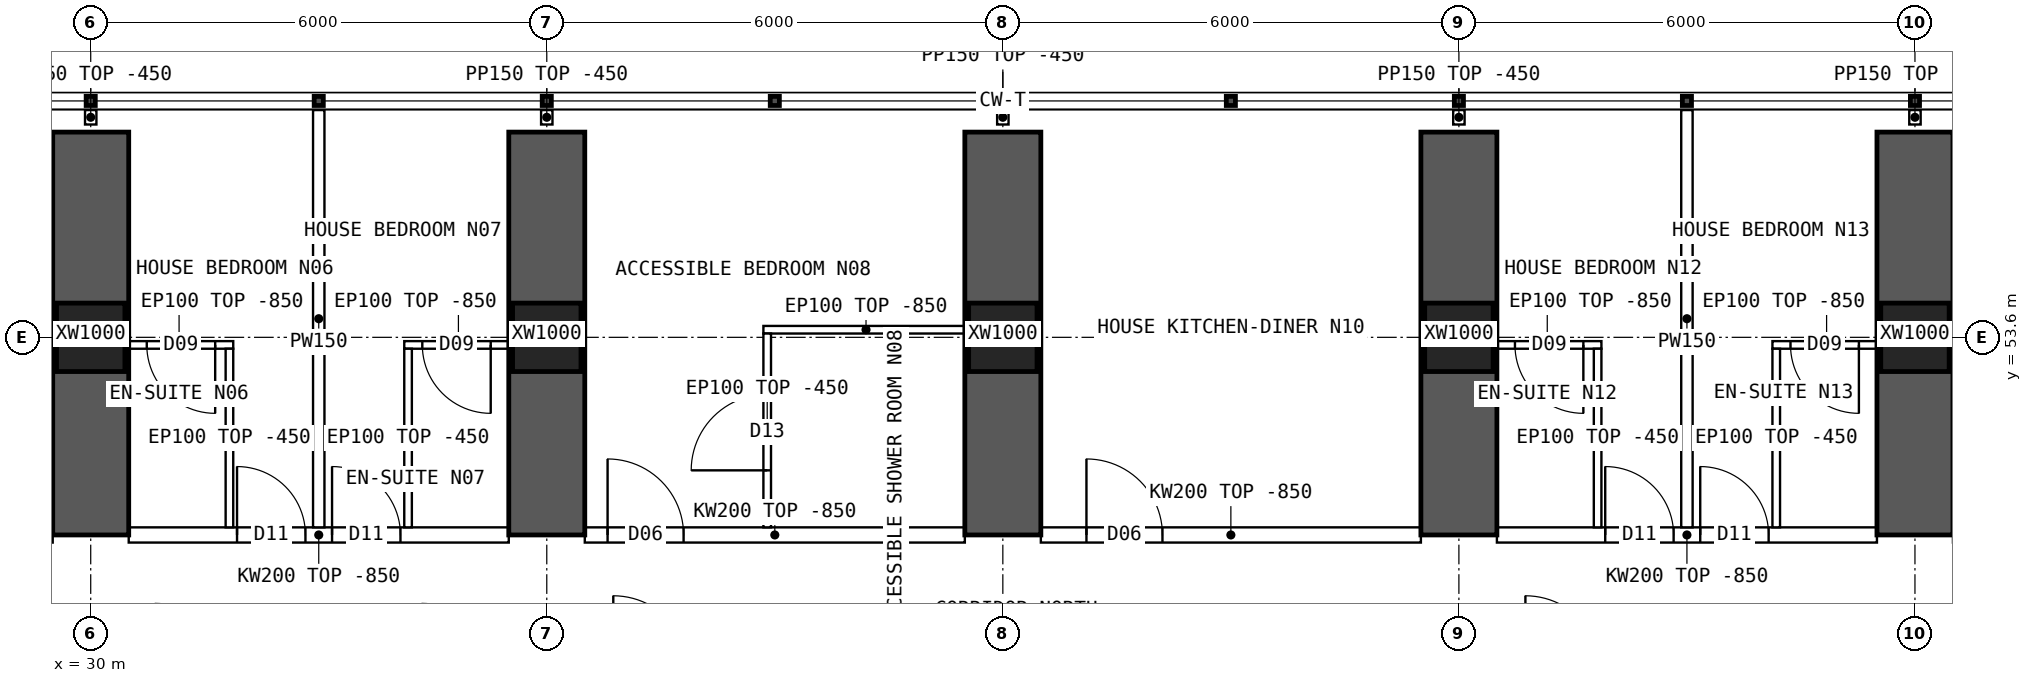
"""IFC4 building model, lengths in metres.
Left out: names, types, materials, properties, quantities, classifications, styles, units other than length and angle.
Written with IfcOpenShell. Run it as: python <this file> out.ifc"""

import sys

from ifc_helpers import new_model, si_unit, direction, frame, frame_2d, origin, origin_2d, place, context, subcontext, project, spatial, polyline, rectangle, hollow_rectangle, outline, extrude, element, fill, save


model = new_model("IFC4")
c1 = context("Model", 3, precision=1e-05, world=origin(), true_north=direction((0.0, 1.0)))
c2 = subcontext(c1, "Body", "Model", "MODEL_VIEW")
j1 = project(units=[si_unit("LENGTHUNIT", "METRE"), si_unit("PLANEANGLEUNIT", "RADIAN")], contexts=[c1])
p1 = place(None, origin())
s1 = spatial("IfcSite", under=j1, at=p1, CompositionType="ELEMENT")
p2 = place(p1, origin())
s2 = spatial("IfcBuilding", under=s1, at=p2, CompositionType="ELEMENT")
p3 = place(p2, frame((0.0, 0.0, 20.2)))
s3 = spatial("IfcBuildingStorey", under=s2, at=p3, CompositionType="ELEMENT", Elevation=20.2)
for number, where, z_axis, x_axis in (
    (1, (30.0, 53.6, 0.0), (0.0, 0.0, 1.0), (1.0, 0.0, 0.0)),
    (2, (36.0, 53.6, 0.0), (0.0, 0.0, 1.0), (1.0, 0.0, 0.0)),
    (3, (42.0, 53.6, 0.0), (0.0, 0.0, 1.0), (1.0, 0.0, 0.0)),
    (4, (48.0, 53.6, 0.0), (0.0, 0.0, 1.0), (1.0, 0.0, 0.0)),
    (5, (54.0, 53.6, 0.0), (0.0, 0.0, 1.0), (1.0, 0.0, 0.0)),
):
    element("IfcColumn", number, at=place(p3, frame(where, z_axis=z_axis, x_axis=x_axis)), inside=s3, PredefinedType="COLUMN", context=c2, shape_type="SweptSolid", body=[
        extrude(hollow_rectangle(XDim=0.9, YDim=0.9, WallThickness=0.09, at=origin_2d()), origin(), (0.0, 0.0, 1.0), 3.75),
    ])
for number, where, z_axis, x_axis in (
    (6, (30.0, 51.0, 0.0), (0.0, 0.0, 1.0), (0.0, 1.0, 0.0)),
    (7, (36.0, 51.0, 0.0), (0.0, 0.0, 1.0), (0.0, 1.0, 0.0)),
    (8, (42.0, 51.0, 0.0), (0.0, 0.0, 1.0), (0.0, 1.0, 0.0)),
    (9, (48.0, 51.0, 0.0), (0.0, 0.0, 1.0), (0.0, 1.0, 0.0)),
    (10, (54.0, 51.0, 0.0), (0.0, 0.0, 1.0), (0.0, 1.0, 0.0)),
):
    element("IfcWall", number, at=place(p3, frame(where, z_axis=z_axis, x_axis=x_axis)), inside=s3, PredefinedType="SHEAR", context=c2, shape_type="SweptSolid", body=[
        extrude(rectangle(XDim=5.3, YDim=1.0, at=frame_2d((2.65, 0.0))), origin(), (0.0, 0.0, 1.0), 3.75),
    ])
p4 = place(p3, frame((30.5, 51.0, 0.0), z_axis=(0.0, 0.0, 1.0), x_axis=(1.0, 0.0, 0.0)))
e11 = element("IfcWall", 11, at=p4, inside=s3, PredefinedType="SOLIDWALL", context=c2, shape_type="SweptSolid", body=[
    extrude(outline(polyline([(0.0, 0.0), (5.0, 0.0), (5.0, 2.9), (0.0, 2.9), (0.0, 0.0)])), frame((0.0, 0.1, 0.0), z_axis=(0.0, -1.0, 0.0), x_axis=(1.0, 0.0, 0.0)), (0.0, 0.0, 1.0), 0.2),
])
p5 = place(p4, frame((1.425, 0.0, 0.0)))
e12 = element("IfcOpeningElement", 12, at=p5, cuts=e11, PredefinedType="OPENING", context=c2, shape_type="SweptSolid", body=[
    extrude(rectangle(XDim=0.9, YDim=2.1, at=frame_2d((0.45, 1.05))), frame((0.0, 0.11, 0.0), z_axis=(0.0, -1.0, 0.0), x_axis=(1.0, 0.0, 0.0)), (0.0, 0.0, 1.0), 0.22),
])
p6 = place(p4, frame((2.675, 0.0, 0.0)))
e13 = element("IfcOpeningElement", 13, at=p6, cuts=e11, PredefinedType="OPENING", context=c2, shape_type="SweptSolid", body=[
    extrude(rectangle(XDim=0.9, YDim=2.1, at=frame_2d((0.45, 1.05))), frame((0.0, 0.11, 0.0), z_axis=(0.0, -1.0, 0.0), x_axis=(1.0, 0.0, 0.0)), (0.0, 0.0, 1.0), 0.22),
])
p7 = place(p3, frame((36.5, 51.0, 0.0), z_axis=(0.0, 0.0, 1.0), x_axis=(1.0, 0.0, 0.0)))
e14 = element("IfcWall", 14, at=p7, inside=s3, PredefinedType="SOLIDWALL", context=c2, shape_type="SweptSolid", body=[
    extrude(outline(polyline([(0.0, 0.0), (5.0, 0.0), (5.0, 2.9), (0.0, 2.9), (0.0, 0.0)])), frame((0.0, 0.1, 0.0), z_axis=(0.0, -1.0, 0.0), x_axis=(1.0, 0.0, 0.0)), (0.0, 0.0, 1.0), 0.2),
])
p8 = place(p7, frame((0.3, 0.0, 0.0)))
e15 = element("IfcOpeningElement", 15, at=p8, cuts=e14, PredefinedType="OPENING", context=c2, shape_type="SweptSolid", body=[
    extrude(rectangle(XDim=1.0, YDim=2.1, at=frame_2d((0.5, 1.05))), frame((0.0, 0.11, 0.0), z_axis=(0.0, -1.0, 0.0), x_axis=(1.0, 0.0, 0.0)), (0.0, 0.0, 1.0), 0.22),
])
p9 = place(p3, frame((42.5, 51.0, 0.0), z_axis=(0.0, 0.0, 1.0), x_axis=(1.0, 0.0, 0.0)))
e16 = element("IfcWall", 16, at=p9, inside=s3, PredefinedType="SOLIDWALL", context=c2, shape_type="SweptSolid", body=[
    extrude(outline(polyline([(0.0, 0.0), (5.0, 0.0), (5.0, 2.9), (0.0, 2.9), (0.0, 0.0)])), frame((0.0, 0.1, 0.0), z_axis=(0.0, -1.0, 0.0), x_axis=(1.0, 0.0, 0.0)), (0.0, 0.0, 1.0), 0.2),
])
p10 = place(p9, frame((0.6, 0.0, 0.0)))
e17 = element("IfcOpeningElement", 17, at=p10, cuts=e16, PredefinedType="OPENING", context=c2, shape_type="SweptSolid", body=[
    extrude(rectangle(XDim=1.0, YDim=2.1, at=frame_2d((0.5, 1.05))), frame((0.0, 0.11, 0.0), z_axis=(0.0, -1.0, 0.0), x_axis=(1.0, 0.0, 0.0)), (0.0, 0.0, 1.0), 0.22),
])
p11 = place(p3, frame((48.5, 51.0, 0.0), z_axis=(0.0, 0.0, 1.0), x_axis=(1.0, 0.0, 0.0)))
e18 = element("IfcWall", 18, at=p11, inside=s3, PredefinedType="SOLIDWALL", context=c2, shape_type="SweptSolid", body=[
    extrude(outline(polyline([(0.0, 0.0), (5.0, 0.0), (5.0, 2.9), (0.0, 2.9), (0.0, 0.0)])), frame((0.0, 0.1, 0.0), z_axis=(0.0, -1.0, 0.0), x_axis=(1.0, 0.0, 0.0)), (0.0, 0.0, 1.0), 0.2),
])
p12 = place(p11, frame((1.425, 0.0, 0.0)))
e19 = element("IfcOpeningElement", 19, at=p12, cuts=e18, PredefinedType="OPENING", context=c2, shape_type="SweptSolid", body=[
    extrude(rectangle(XDim=0.9, YDim=2.1, at=frame_2d((0.45, 1.05))), frame((0.0, 0.11, 0.0), z_axis=(0.0, -1.0, 0.0), x_axis=(1.0, 0.0, 0.0)), (0.0, 0.0, 1.0), 0.22),
])
p13 = place(p11, frame((2.675, 0.0, 0.0)))
e20 = element("IfcOpeningElement", 20, at=p13, cuts=e18, PredefinedType="OPENING", context=c2, shape_type="SweptSolid", body=[
    extrude(rectangle(XDim=0.9, YDim=2.1, at=frame_2d((0.45, 1.05))), frame((0.0, 0.11, 0.0), z_axis=(0.0, -1.0, 0.0), x_axis=(1.0, 0.0, 0.0)), (0.0, 0.0, 1.0), 0.22),
])
p14 = place(p3, frame((33.0, 56.59, 0.0), z_axis=(0.0, 0.0, 1.0), x_axis=(0.0, -1.0, 0.0)))
e21 = element("IfcWall", 21, at=p14, inside=s3, PredefinedType="PARTITIONING", context=c2, shape_type="SweptSolid", body=[
    extrude(outline(polyline([(0.0, 0.0), (5.49, 0.0), (5.49, 2.9), (5.442, 2.9), (5.44, 3.3), (3.192, 3.3), (3.19, 2.9), (2.792, 2.9), (2.79, 3.3), (0.0, 3.3), (0.0, 0.0)])), frame((0.0, 0.075, 0.0), z_axis=(0.0, -1.0, 0.0), x_axis=(1.0, 0.0, 0.0)), (0.0, 0.0, 1.0), 0.15),
])
p15 = place(p3, frame((30.45, 53.5, 0.0), z_axis=(0.0, 0.0, 1.0), x_axis=(1.0, 0.0, 0.0)))
e22 = element("IfcWall", 22, at=p15, inside=s3, PredefinedType="PARTITIONING", context=c2, shape_type="SweptSolid", body=[
    extrude(outline(polyline([(0.0, 0.0), (1.425, 0.0), (1.425, 2.9), (0.0, 2.9), (0.0, 0.0)])), frame((0.0, 0.05, 0.0), z_axis=(0.0, -1.0, 0.0), x_axis=(1.0, 0.0, 0.0)), (0.0, 0.0, 1.0), 0.1),
])
p16 = place(p15, frame((0.288, 0.0, 0.0)))
e23 = element("IfcOpeningElement", 23, at=p16, cuts=e22, PredefinedType="OPENING", context=c2, shape_type="SweptSolid", body=[
    extrude(rectangle(XDim=0.9, YDim=2.1, at=frame_2d((0.45, 1.05))), frame((0.0, 0.06, 0.0), z_axis=(0.0, -1.0, 0.0), x_axis=(1.0, 0.0, 0.0)), (0.0, 0.0, 1.0), 0.12),
])
p17 = place(p3, frame((31.825, 53.45, 0.0), z_axis=(0.0, 0.0, 1.0), x_axis=(0.0, -1.0, 0.0)))
e24 = element("IfcWall", 24, at=p17, inside=s3, PredefinedType="PARTITIONING", context=c2, shape_type="SweptSolid", body=[
    extrude(outline(polyline([(0.0, 0.0), (2.35, 0.0), (2.35, 2.9), (2.302, 2.9), (2.3, 3.3), (0.052, 3.3), (0.05, 2.9), (0.0, 2.9), (0.0, 0.0)])), frame((0.0, 0.05, 0.0), z_axis=(0.0, -1.0, 0.0), x_axis=(1.0, 0.0, 0.0)), (0.0, 0.0, 1.0), 0.1),
])
p18 = place(p3, frame((34.125, 53.5, 0.0), z_axis=(0.0, 0.0, 1.0), x_axis=(1.0, 0.0, 0.0)))
e25 = element("IfcWall", 25, at=p18, inside=s3, PredefinedType="PARTITIONING", context=c2, shape_type="SweptSolid", body=[
    extrude(outline(polyline([(0.0, 0.0), (1.425, 0.0), (1.425, 2.9), (0.0, 2.9), (0.0, 0.0)])), frame((0.0, 0.05, 0.0), z_axis=(0.0, -1.0, 0.0), x_axis=(1.0, 0.0, 0.0)), (0.0, 0.0, 1.0), 0.1),
])
p19 = place(p18, frame((0.238, 0.0, 0.0)))
e26 = element("IfcOpeningElement", 26, at=p19, cuts=e25, PredefinedType="OPENING", context=c2, shape_type="SweptSolid", body=[
    extrude(rectangle(XDim=0.9, YDim=2.1, at=frame_2d((0.45, 1.05))), frame((0.0, 0.06, 0.0), z_axis=(0.0, -1.0, 0.0), x_axis=(1.0, 0.0, 0.0)), (0.0, 0.0, 1.0), 0.12),
])
p20 = place(p3, frame((34.175, 53.45, 0.0), z_axis=(0.0, 0.0, 1.0), x_axis=(0.0, -1.0, 0.0)))
e27 = element("IfcWall", 27, at=p20, inside=s3, PredefinedType="PARTITIONING", context=c2, shape_type="SweptSolid", body=[
    extrude(outline(polyline([(0.0, 0.0), (2.35, 0.0), (2.35, 2.9), (2.302, 2.9), (2.3, 3.3), (0.052, 3.3), (0.05, 2.9), (0.0, 2.9), (0.0, 0.0)])), frame((0.0, 0.05, 0.0), z_axis=(0.0, -1.0, 0.0), x_axis=(1.0, 0.0, 0.0)), (0.0, 0.0, 1.0), 0.1),
])
p21 = place(p3, frame((38.85, 53.7, 0.0), z_axis=(0.0, 0.0, 1.0), x_axis=(1.0, 0.0, 0.0)))
e28 = element("IfcWall", 28, at=p21, inside=s3, PredefinedType="PARTITIONING", context=c2, shape_type="SweptSolid", body=[
    extrude(outline(polyline([(0.0, 0.0), (2.7, 0.0), (2.7, 2.9), (0.0, 2.9), (0.0, 0.0)])), frame((0.0, 0.05, 0.0), z_axis=(0.0, -1.0, 0.0), x_axis=(1.0, 0.0, 0.0)), (0.0, 0.0, 1.0), 0.1),
])
p22 = place(p3, frame((38.9, 53.65, 0.0), z_axis=(0.0, 0.0, 1.0), x_axis=(0.0, -1.0, 0.0)))
e29 = element("IfcWall", 29, at=p22, inside=s3, PredefinedType="PARTITIONING", context=c2, shape_type="SweptSolid", body=[
    extrude(outline(polyline([(0.0, 0.0), (2.55, 0.0), (2.55, 2.9), (2.502, 2.9), (2.5, 3.3), (0.252, 3.3), (0.25, 2.9), (0.0, 2.9), (0.0, 0.0)])), frame((0.0, 0.05, 0.0), z_axis=(0.0, -1.0, 0.0), x_axis=(1.0, 0.0, 0.0)), (0.0, 0.0, 1.0), 0.1),
])
p23 = place(p22, frame((0.8, 0.0, 0.0)))
e30 = element("IfcOpeningElement", 30, at=p23, cuts=e29, PredefinedType="OPENING", context=c2, shape_type="SweptSolid", body=[
    extrude(rectangle(XDim=1.0, YDim=2.1, at=frame_2d((0.5, 1.05))), frame((0.0, 0.06, 0.0), z_axis=(0.0, -1.0, 0.0), x_axis=(1.0, 0.0, 0.0)), (0.0, 0.0, 1.0), 0.12),
])
p24 = place(p3, frame((51.0, 56.59, 0.0), z_axis=(0.0, 0.0, 1.0), x_axis=(0.0, -1.0, 0.0)))
e31 = element("IfcWall", 31, at=p24, inside=s3, PredefinedType="PARTITIONING", context=c2, shape_type="SweptSolid", body=[
    extrude(outline(polyline([(0.0, 0.0), (5.49, 0.0), (5.49, 2.9), (5.442, 2.9), (5.44, 3.3), (3.192, 3.3), (3.19, 2.9), (2.792, 2.9), (2.79, 3.3), (0.0, 3.3), (0.0, 0.0)])), frame((0.0, 0.075, 0.0), z_axis=(0.0, -1.0, 0.0), x_axis=(1.0, 0.0, 0.0)), (0.0, 0.0, 1.0), 0.15),
])
p25 = place(p3, frame((48.45, 53.5, 0.0), z_axis=(0.0, 0.0, 1.0), x_axis=(1.0, 0.0, 0.0)))
e32 = element("IfcWall", 32, at=p25, inside=s3, PredefinedType="PARTITIONING", context=c2, shape_type="SweptSolid", body=[
    extrude(outline(polyline([(0.0, 0.0), (1.425, 0.0), (1.425, 2.9), (0.0, 2.9), (0.0, 0.0)])), frame((0.0, 0.05, 0.0), z_axis=(0.0, -1.0, 0.0), x_axis=(1.0, 0.0, 0.0)), (0.0, 0.0, 1.0), 0.1),
])
p26 = place(p25, frame((0.288, 0.0, 0.0)))
e33 = element("IfcOpeningElement", 33, at=p26, cuts=e32, PredefinedType="OPENING", context=c2, shape_type="SweptSolid", body=[
    extrude(rectangle(XDim=0.9, YDim=2.1, at=frame_2d((0.45, 1.05))), frame((0.0, 0.06, 0.0), z_axis=(0.0, -1.0, 0.0), x_axis=(1.0, 0.0, 0.0)), (0.0, 0.0, 1.0), 0.12),
])
p27 = place(p3, frame((49.825, 53.45, 0.0), z_axis=(0.0, 0.0, 1.0), x_axis=(0.0, -1.0, 0.0)))
e34 = element("IfcWall", 34, at=p27, inside=s3, PredefinedType="PARTITIONING", context=c2, shape_type="SweptSolid", body=[
    extrude(outline(polyline([(0.0, 0.0), (2.35, 0.0), (2.35, 2.9), (2.302, 2.9), (2.3, 3.3), (0.052, 3.3), (0.05, 2.9), (0.0, 2.9), (0.0, 0.0)])), frame((0.0, 0.05, 0.0), z_axis=(0.0, -1.0, 0.0), x_axis=(1.0, 0.0, 0.0)), (0.0, 0.0, 1.0), 0.1),
])
p28 = place(p3, frame((52.125, 53.5, 0.0), z_axis=(0.0, 0.0, 1.0), x_axis=(1.0, 0.0, 0.0)))
e35 = element("IfcWall", 35, at=p28, inside=s3, PredefinedType="PARTITIONING", context=c2, shape_type="SweptSolid", body=[
    extrude(outline(polyline([(0.0, 0.0), (1.425, 0.0), (1.425, 2.9), (0.0, 2.9), (0.0, 0.0)])), frame((0.0, 0.05, 0.0), z_axis=(0.0, -1.0, 0.0), x_axis=(1.0, 0.0, 0.0)), (0.0, 0.0, 1.0), 0.1),
])
p29 = place(p28, frame((0.238, 0.0, 0.0)))
e36 = element("IfcOpeningElement", 36, at=p29, cuts=e35, PredefinedType="OPENING", context=c2, shape_type="SweptSolid", body=[
    extrude(rectangle(XDim=0.9, YDim=2.1, at=frame_2d((0.45, 1.05))), frame((0.0, 0.06, 0.0), z_axis=(0.0, -1.0, 0.0), x_axis=(1.0, 0.0, 0.0)), (0.0, 0.0, 1.0), 0.12),
])
p30 = place(p3, frame((52.175, 53.45, 0.0), z_axis=(0.0, 0.0, 1.0), x_axis=(0.0, -1.0, 0.0)))
e37 = element("IfcWall", 37, at=p30, inside=s3, PredefinedType="PARTITIONING", context=c2, shape_type="SweptSolid", body=[
    extrude(outline(polyline([(0.0, 0.0), (2.35, 0.0), (2.35, 2.9), (2.302, 2.9), (2.3, 3.3), (0.052, 3.3), (0.05, 2.9), (0.0, 2.9), (0.0, 0.0)])), frame((0.0, 0.05, 0.0), z_axis=(0.0, -1.0, 0.0), x_axis=(1.0, 0.0, 0.0)), (0.0, 0.0, 1.0), 0.1),
])
for number, where, z_axis, x_axis in (
    (38, (30.0, 56.4, 0.0), (0.0, 0.0, 1.0), (0.0, 1.0, 0.0)),
    (39, (36.0, 56.4, 0.0), (0.0, 0.0, 1.0), (0.0, 1.0, 0.0)),
    (40, (42.0, 56.4, 0.0), (0.0, 0.0, 1.0), (0.0, 1.0, 0.0)),
    (41, (48.0, 56.4, 0.0), (0.0, 0.0, 1.0), (0.0, 1.0, 0.0)),
    (42, (54.0, 56.4, 0.0), (0.0, 0.0, 1.0), (0.0, 1.0, 0.0)),
):
    element("IfcWall", number, at=place(p3, frame(where, z_axis=z_axis, x_axis=x_axis)), inside=s3, PredefinedType="PARTITIONING", context=c2, shape_type="SweptSolid", body=[
        extrude(rectangle(XDim=0.19, YDim=0.15, at=frame_2d((0.095, 0.0))), origin(), (0.0, 0.0, 1.0), 3.3),
    ])
p31 = place(p16, origin())
e43 = element("IfcDoor", 43, at=p31, inside=s3, OperationType="SINGLE_SWING_RIGHT", PredefinedType="DOOR", context=c2, shape_type="SweptSolid", body=[
    extrude(rectangle(XDim=0.9, YDim=2.1, at=frame_2d((0.45, 1.05))), frame((0.0, 0.025, 0.0), z_axis=(0.0, -1.0, 0.0), x_axis=(1.0, 0.0, 0.0)), (0.0, 0.0, 1.0), 0.05),
])
fill(e23, e43)
p32 = place(p5, origin())
e44 = element("IfcDoor", 44, at=p32, inside=s3, OperationType="SINGLE_SWING_LEFT", PredefinedType="DOOR", context=c2, shape_type="SweptSolid", body=[
    extrude(rectangle(XDim=0.9, YDim=2.1, at=frame_2d((0.45, 1.05))), frame((0.0, 0.025, 0.0), z_axis=(0.0, -1.0, 0.0), x_axis=(1.0, 0.0, 0.0)), (0.0, 0.0, 1.0), 0.05),
])
fill(e12, e44)
p33 = place(p19, origin())
e45 = element("IfcDoor", 45, at=p33, inside=s3, OperationType="SINGLE_SWING_RIGHT", PredefinedType="DOOR", context=c2, shape_type="SweptSolid", body=[
    extrude(rectangle(XDim=0.9, YDim=2.1, at=frame_2d((0.45, 1.05))), frame((0.0, 0.025, 0.0), z_axis=(0.0, -1.0, 0.0), x_axis=(1.0, 0.0, 0.0)), (0.0, 0.0, 1.0), 0.05),
])
fill(e26, e45)
p34 = place(p6, origin())
e46 = element("IfcDoor", 46, at=p34, inside=s3, OperationType="SINGLE_SWING_LEFT", PredefinedType="DOOR", context=c2, shape_type="SweptSolid", body=[
    extrude(rectangle(XDim=0.9, YDim=2.1, at=frame_2d((0.45, 1.05))), frame((0.0, 0.025, 0.0), z_axis=(0.0, -1.0, 0.0), x_axis=(1.0, 0.0, 0.0)), (0.0, 0.0, 1.0), 0.05),
])
fill(e13, e46)
p35 = place(p23, origin())
e47 = element("IfcDoor", 47, at=p35, inside=s3, OperationType="SINGLE_SWING_RIGHT", PredefinedType="DOOR", context=c2, shape_type="SweptSolid", body=[
    extrude(rectangle(XDim=1.0, YDim=2.1, at=frame_2d((0.5, 1.05))), frame((0.0, 0.025, 0.0), z_axis=(0.0, -1.0, 0.0), x_axis=(1.0, 0.0, 0.0)), (0.0, 0.0, 1.0), 0.05),
])
fill(e30, e47)
p36 = place(p8, origin())
e48 = element("IfcDoor", 48, at=p36, inside=s3, OperationType="SINGLE_SWING_LEFT", PredefinedType="DOOR", context=c2, shape_type="SweptSolid", body=[
    extrude(rectangle(XDim=1.0, YDim=2.1, at=frame_2d((0.5, 1.05))), frame((0.0, 0.025, 0.0), z_axis=(0.0, -1.0, 0.0), x_axis=(1.0, 0.0, 0.0)), (0.0, 0.0, 1.0), 0.05),
])
fill(e15, e48)
p37 = place(p10, origin())
e49 = element("IfcDoor", 49, at=p37, inside=s3, OperationType="SINGLE_SWING_LEFT", PredefinedType="DOOR", context=c2, shape_type="SweptSolid", body=[
    extrude(rectangle(XDim=1.0, YDim=2.1, at=frame_2d((0.5, 1.05))), frame((0.0, 0.025, 0.0), z_axis=(0.0, -1.0, 0.0), x_axis=(1.0, 0.0, 0.0)), (0.0, 0.0, 1.0), 0.05),
])
fill(e17, e49)
p38 = place(p26, origin())
e50 = element("IfcDoor", 50, at=p38, inside=s3, OperationType="SINGLE_SWING_RIGHT", PredefinedType="DOOR", context=c2, shape_type="SweptSolid", body=[
    extrude(rectangle(XDim=0.9, YDim=2.1, at=frame_2d((0.45, 1.05))), frame((0.0, 0.025, 0.0), z_axis=(0.0, -1.0, 0.0), x_axis=(1.0, 0.0, 0.0)), (0.0, 0.0, 1.0), 0.05),
])
fill(e33, e50)
p39 = place(p12, origin())
e51 = element("IfcDoor", 51, at=p39, inside=s3, OperationType="SINGLE_SWING_LEFT", PredefinedType="DOOR", context=c2, shape_type="SweptSolid", body=[
    extrude(rectangle(XDim=0.9, YDim=2.1, at=frame_2d((0.45, 1.05))), frame((0.0, 0.025, 0.0), z_axis=(0.0, -1.0, 0.0), x_axis=(1.0, 0.0, 0.0)), (0.0, 0.0, 1.0), 0.05),
])
fill(e19, e51)
p40 = place(p29, origin())
e52 = element("IfcDoor", 52, at=p40, inside=s3, OperationType="SINGLE_SWING_RIGHT", PredefinedType="DOOR", context=c2, shape_type="SweptSolid", body=[
    extrude(rectangle(XDim=0.9, YDim=2.1, at=frame_2d((0.45, 1.05))), frame((0.0, 0.025, 0.0), z_axis=(0.0, -1.0, 0.0), x_axis=(1.0, 0.0, 0.0)), (0.0, 0.0, 1.0), 0.05),
])
fill(e36, e52)
p41 = place(p13, origin())
e53 = element("IfcDoor", 53, at=p41, inside=s3, OperationType="SINGLE_SWING_LEFT", PredefinedType="DOOR", context=c2, shape_type="SweptSolid", body=[
    extrude(rectangle(XDim=0.9, YDim=2.1, at=frame_2d((0.45, 1.05))), frame((0.0, 0.025, 0.0), z_axis=(0.0, -1.0, 0.0), x_axis=(1.0, 0.0, 0.0)), (0.0, 0.0, 1.0), 0.05),
])
fill(e20, e53)
save(model, sys.argv[1])
